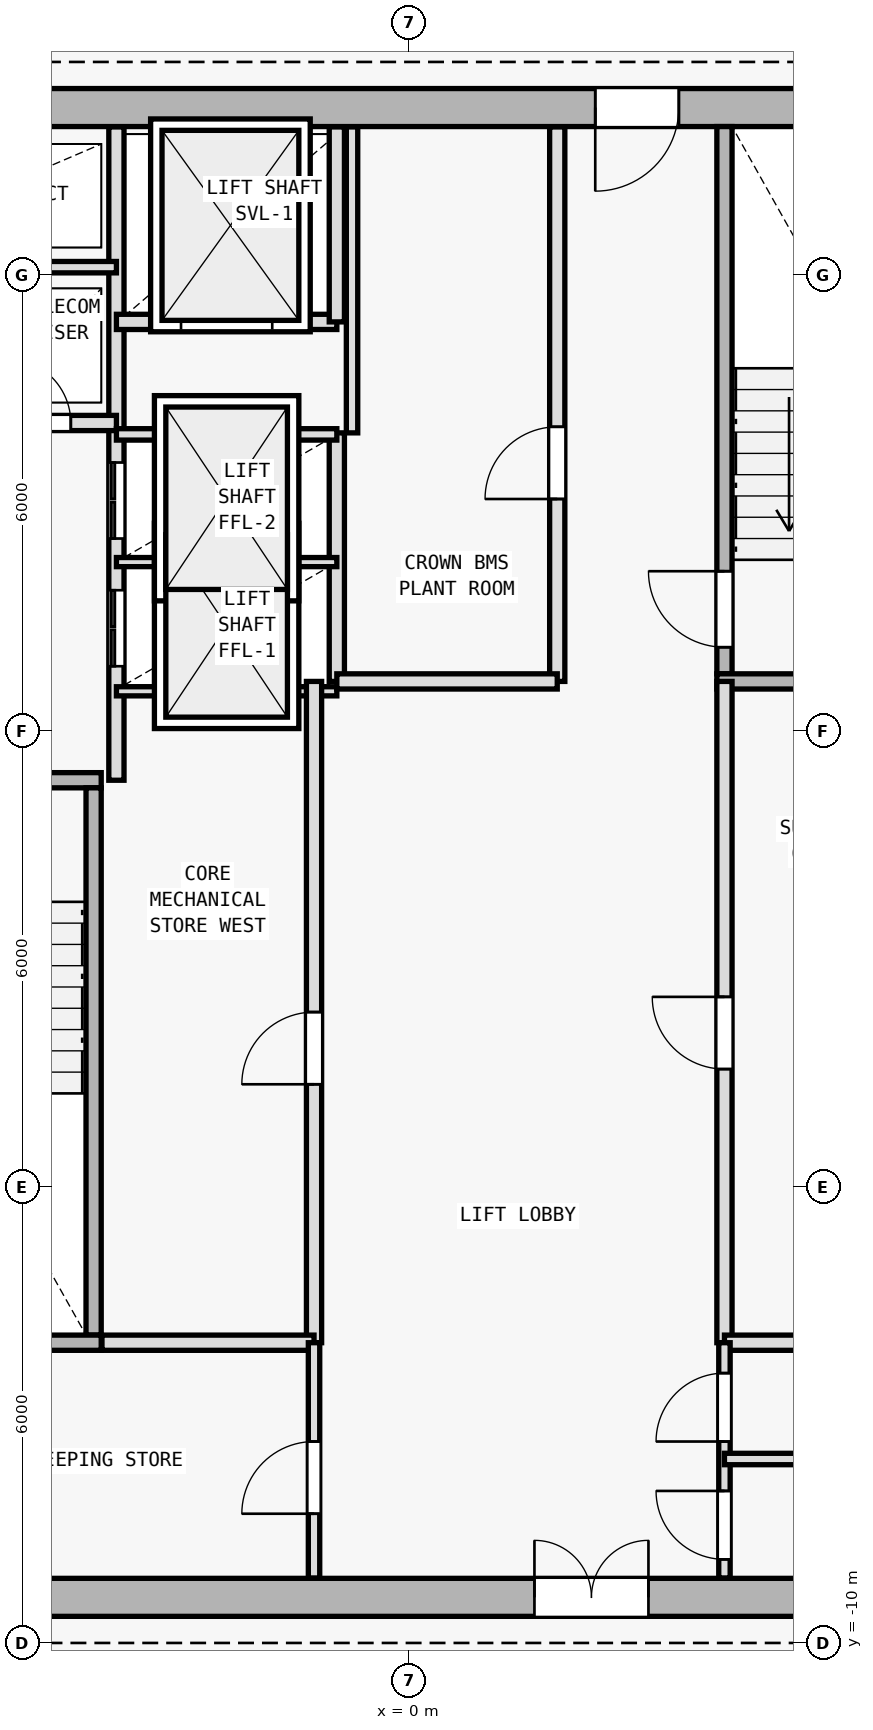
"""IFC4 building model, lengths in metres.
Left out: names, types, materials, properties, quantities, classifications, styles, units other than length and angle.
Written with IfcOpenShell. Run it as: python <this file> out.ifc"""

import sys

from ifc_helpers import new_model, si_unit, direction, frame, frame_2d, origin, origin_2d, place, context, subcontext, project, spatial, rectangle, i_section, extrude, element, fill, save


model = new_model("IFC4")
c1 = context("Model", 3, precision=1e-05, world=origin(), true_north=direction((0.0, 1.0)))
c2 = subcontext(c1, "Body", "Model", "MODEL_VIEW")
j1 = project(units=[si_unit("LENGTHUNIT", "METRE"), si_unit("PLANEANGLEUNIT", "RADIAN")], contexts=[c1])
p1 = place(None, origin())
s1 = spatial("IfcSite", under=j1, at=p1, CompositionType="ELEMENT")
p2 = place(p1, origin())
s2 = spatial("IfcBuilding", under=s1, at=p2, CompositionType="ELEMENT")
p3 = place(p2, frame((0.0, 0.0, 312.0)))
s3 = spatial("IfcBuildingStorey", under=s2, at=p3, CompositionType="ELEMENT", Elevation=312.0)
p4 = place(p3, frame((0.0, -9.4, 0.0), z_axis=(0.0, 0.0, 1.0), x_axis=(1.0, 0.0, 0.0)))
e1 = element("IfcColumn", 1, at=p4, inside=s3, PredefinedType="COLUMN", context=c2, shape_type="SweptSolid", body=[
    extrude(i_section(OverallWidth=0.374, OverallDepth=0.372, WebThickness=0.012, FlangeThickness=0.02, FilletRadius=0.015, at=origin_2d()), origin(), (0.0, 0.0, 1.0), 3.6),
])
p5 = place(p3, frame((-7.95, -9.4, 0.0), z_axis=(0.0, 0.0, 1.0), x_axis=(1.0, 0.0, 0.0)))
e2 = element("IfcWall", 2, at=p5, inside=s3, PredefinedType="SHEAR", context=c2, shape_type="SweptSolid", body=[
    extrude(rectangle(XDim=15.9, YDim=0.5, at=frame_2d((7.95, 0.0))), origin(), (0.0, 0.0, 1.0), 3.34),
])
p6 = place(p5, frame((9.6, 0.0, 0.0)))
e3 = element("IfcOpeningElement", 3, at=p6, cuts=e2, PredefinedType="OPENING", context=c2, shape_type="SweptSolid", body=[
    extrude(rectangle(XDim=1.5, YDim=2.2, at=frame_2d((0.75, 1.1))), frame((0.0, 0.26, 0.0), z_axis=(0.0, -1.0, 0.0), x_axis=(1.0, 0.0, 0.0)), (0.0, 0.0, 1.0), 0.52),
])
p7 = place(p3, frame((7.95, 10.2, 0.0), z_axis=(0.0, 0.0, 1.0), x_axis=(-1.0, 0.0, 0.0)))
e4 = element("IfcWall", 4, at=p7, inside=s3, PredefinedType="SHEAR", context=c2, shape_type="SweptSolid", body=[
    extrude(rectangle(XDim=15.9, YDim=0.5, at=frame_2d((7.95, 0.0))), origin(), (0.0, 0.0, 1.0), 3.34),
])
p8 = place(p7, frame((4.4, 0.0, 0.0)))
e5 = element("IfcOpeningElement", 5, at=p8, cuts=e4, PredefinedType="OPENING", context=c2, shape_type="SweptSolid", body=[
    extrude(rectangle(XDim=1.1, YDim=2.15, at=frame_2d((0.55, 1.075))), frame((0.0, 0.26, 0.0), z_axis=(0.0, -1.0, 0.0), x_axis=(1.0, 0.0, 0.0)), (0.0, 0.0, 1.0), 0.52),
])
p9 = place(p3, frame((-7.45, 1.35, 0.0), z_axis=(0.0, 0.0, 1.0), x_axis=(1.0, 0.0, 0.0)))
e6 = element("IfcWall", 6, at=p9, inside=s3, PredefinedType="SOLIDWALL", context=c2, shape_type="SweptSolid", body=[
    extrude(rectangle(XDim=3.4, YDim=0.2, at=frame_2d((1.7, 0.0))), origin(), (0.0, 0.0, 1.0), 3.34),
])
p10 = place(p9, frame((0.65, 0.0, 0.0)))
e7 = element("IfcOpeningElement", 7, at=p10, cuts=e6, PredefinedType="OPENING", context=c2, shape_type="SweptSolid", body=[
    extrude(rectangle(XDim=1.0, YDim=2.15, at=frame_2d((0.5, 1.075))), frame((0.0, 0.11, 0.0), z_axis=(0.0, -1.0, 0.0), x_axis=(1.0, 0.0, 0.0)), (0.0, 0.0, 1.0), 0.22),
])
p11 = place(p3, frame((-4.15, -5.95, 0.0), z_axis=(0.0, 0.0, 1.0), x_axis=(0.0, 1.0, 0.0)))
e8 = element("IfcWall", 8, at=p11, inside=s3, PredefinedType="SOLIDWALL", context=c2, shape_type="SweptSolid", body=[
    extrude(rectangle(XDim=7.2, YDim=0.2, at=frame_2d((3.6, 0.0))), origin(), (0.0, 0.0, 1.0), 3.34),
])
p12 = place(p3, frame((-3.85, 1.35, 0.0), z_axis=(0.0, 0.0, 1.0), x_axis=(0.0, 1.0, 0.0)))
e9 = element("IfcWall", 9, at=p12, inside=s3, PredefinedType="SOLIDWALL", context=c2, shape_type="SweptSolid", body=[
    extrude(rectangle(XDim=8.595, YDim=0.2, at=frame_2d((4.297, 0.0))), origin(), (0.0, 0.0, 1.0), 3.34),
])
p13 = place(p12, frame((1.5, 0.0, 0.0)))
e10 = element("IfcOpeningElement", 10, at=p13, cuts=e9, PredefinedType="OPENING", context=c2, shape_type="SweptSolid", body=[
    extrude(rectangle(XDim=1.0, YDim=2.15, at=frame_2d((0.5, 1.075))), frame((0.0, 0.11, 0.0), z_axis=(0.0, -1.0, 0.0), x_axis=(1.0, 0.0, 0.0)), (0.0, 0.0, 1.0), 0.22),
])
p14 = place(p12, frame((3.18, 0.0, 0.0)))
e11 = element("IfcOpeningElement", 11, at=p14, cuts=e9, PredefinedType="OPENING", context=c2, shape_type="SweptSolid", body=[
    extrude(rectangle(XDim=1.0, YDim=2.15, at=frame_2d((0.5, 1.075))), frame((0.0, 0.11, 0.0), z_axis=(0.0, -1.0, 0.0), x_axis=(1.0, 0.0, 0.0)), (0.0, 0.0, 1.0), 0.22),
])
p15 = place(p3, frame((-7.445, 6.05, 0.0), z_axis=(0.0, 0.0, 1.0), x_axis=(1.0, 0.0, 0.0)))
e12 = element("IfcWall", 12, at=p15, inside=s3, PredefinedType="SOLIDWALL", context=c2, shape_type="SweptSolid", body=[
    extrude(rectangle(XDim=3.595, YDim=0.2, at=frame_2d((1.797, 0.0))), origin(), (0.0, 0.0, 1.0), 3.34),
])
p16 = place(p15, frame((0.345, 0.0, 0.0)))
e13 = element("IfcOpeningElement", 13, at=p16, cuts=e12, PredefinedType="OPENING", context=c2, shape_type="SweptSolid", body=[
    extrude(rectangle(XDim=0.85, YDim=2.1, at=frame_2d((0.425, 1.05))), frame((0.0, 0.11, 0.0), z_axis=(0.0, -1.0, 0.0), x_axis=(1.0, 0.0, 0.0)), (0.0, 0.0, 1.0), 0.22),
])
p17 = place(p15, frame((2.145, 0.0, 0.0)))
e14 = element("IfcOpeningElement", 14, at=p17, cuts=e12, PredefinedType="OPENING", context=c2, shape_type="SweptSolid", body=[
    extrude(rectangle(XDim=0.85, YDim=2.1, at=frame_2d((0.425, 1.05))), frame((0.0, 0.11, 0.0), z_axis=(0.0, -1.0, 0.0), x_axis=(1.0, 0.0, 0.0)), (0.0, 0.0, 1.0), 0.22),
])
p18 = place(p3, frame((-7.445, 8.1, 0.0), z_axis=(0.0, 0.0, 1.0), x_axis=(1.0, 0.0, 0.0)))
e15 = element("IfcWall", 15, at=p18, inside=s3, PredefinedType="PARTITIONING", context=c2, shape_type="SweptSolid", body=[
    extrude(rectangle(XDim=3.595, YDim=0.15, at=frame_2d((1.797, 0.0))), origin(), (0.0, 0.0, 1.0), 3.34),
])
p19 = place(p3, frame((4.15, 2.75, 0.0), z_axis=(0.0, 0.0, 1.0), x_axis=(0.0, 1.0, 0.0)))
e16 = element("IfcWall", 16, at=p19, inside=s3, PredefinedType="SOLIDWALL", context=c2, shape_type="SweptSolid", body=[
    extrude(rectangle(XDim=7.2, YDim=0.2, at=frame_2d((3.6, 0.0))), origin(), (0.0, 0.0, 1.0), 3.34),
])
p20 = place(p19, frame((0.35, 0.0, 0.0)))
e17 = element("IfcOpeningElement", 17, at=p20, cuts=e16, PredefinedType="OPENING", context=c2, shape_type="SweptSolid", body=[
    extrude(rectangle(XDim=1.0, YDim=2.15, at=frame_2d((0.5, 1.075))), frame((0.0, 0.11, 0.0), z_axis=(0.0, -1.0, 0.0), x_axis=(1.0, 0.0, 0.0)), (0.0, 0.0, 1.0), 0.22),
])
p21 = place(p3, frame((4.05, 2.65, 0.0), z_axis=(0.0, 0.0, 1.0), x_axis=(1.0, 0.0, 0.0)))
e18 = element("IfcWall", 18, at=p21, inside=s3, PredefinedType="SOLIDWALL", context=c2, shape_type="SweptSolid", body=[
    extrude(rectangle(XDim=3.4, YDim=0.2, at=frame_2d((1.7, 0.0))), origin(), (0.0, 0.0, 1.0), 3.34),
])
p22 = place(p3, frame((-0.95, 2.65, 0.0), z_axis=(0.0, 0.0, 1.0), x_axis=(0.0, 1.0, 0.0)))
e19 = element("IfcWall", 19, at=p22, inside=s3, PredefinedType="SOLIDWALL", context=c2, shape_type="SweptSolid", body=[
    extrude(rectangle(XDim=3.27, YDim=0.2, at=frame_2d((1.635, 0.0))), origin(), (0.0, 0.0, 1.0), 3.34),
])
for number, where, z_axis, x_axis in (
    (20, (-3.85, 2.52, 0.0), (0.0, 0.0, 1.0), (1.0, 0.0, 0.0)),
    (21, (-3.85, 4.22, 0.0), (0.0, 0.0, 1.0), (1.0, 0.0, 0.0)),
):
    element("IfcWall", number, at=place(p3, frame(where, z_axis=z_axis, x_axis=x_axis)), inside=s3, PredefinedType="PARTITIONING", context=c2, shape_type="SweptSolid", body=[
        extrude(rectangle(XDim=2.9, YDim=0.12, at=frame_2d((1.45, 0.0))), origin(), (0.0, 0.0, 1.0), 3.34),
    ])
p23 = place(p3, frame((-3.85, 5.9, 0.0), z_axis=(0.0, 0.0, 1.0), x_axis=(1.0, 0.0, 0.0)))
e22 = element("IfcWall", 22, at=p23, inside=s3, PredefinedType="PARTITIONING", context=c2, shape_type="SweptSolid", body=[
    extrude(rectangle(XDim=2.9, YDim=0.15, at=frame_2d((1.45, 0.0))), origin(), (0.0, 0.0, 1.0), 3.34),
])
p24 = place(p3, frame((-3.85, 7.38, 0.0), z_axis=(0.0, 0.0, 1.0), x_axis=(1.0, 0.0, 0.0)))
e23 = element("IfcWall", 23, at=p24, inside=s3, PredefinedType="SOLIDWALL", context=c2, shape_type="SweptSolid", body=[
    extrude(rectangle(XDim=2.9, YDim=0.2, at=frame_2d((1.45, 0.0))), origin(), (0.0, 0.0, 1.0), 3.34),
])
p25 = place(p24, frame((0.85, 0.0, 0.0)))
e24 = element("IfcOpeningElement", 24, at=p25, cuts=e23, PredefinedType="OPENING", context=c2, shape_type="SweptSolid", body=[
    extrude(rectangle(XDim=1.2, YDim=2.2, at=frame_2d((0.6, 1.1))), frame((0.0, 0.11, 0.0), z_axis=(0.0, -1.0, 0.0), x_axis=(1.0, 0.0, 0.0)), (0.0, 0.0, 1.0), 0.22),
])
p26 = place(p3, frame((-0.95, 7.38, 0.0), z_axis=(0.0, 0.0, 1.0), x_axis=(0.0, 1.0, 0.0)))
e25 = element("IfcWall", 25, at=p26, inside=s3, PredefinedType="SOLIDWALL", context=c2, shape_type="SweptSolid", body=[
    extrude(rectangle(XDim=2.565, YDim=0.2, at=frame_2d((1.283, 0.0))), origin(), (0.0, 0.0, 1.0), 3.34),
])
p27 = place(p3, frame((4.15, -6.05, 0.0), z_axis=(0.0, 0.0, 1.0), x_axis=(0.0, 1.0, 0.0)))
e26 = element("IfcWall", 26, at=p27, inside=s3, PredefinedType="SOLIDWALL", context=c2, shape_type="SweptSolid", body=[
    extrude(rectangle(XDim=8.7, YDim=0.2, at=frame_2d((4.35, 0.0))), origin(), (0.0, 0.0, 1.0), 3.34),
])
p28 = place(p27, frame((3.6, 0.0, 0.0)))
e27 = element("IfcOpeningElement", 27, at=p28, cuts=e26, PredefinedType="OPENING", context=c2, shape_type="SweptSolid", body=[
    extrude(rectangle(XDim=0.95, YDim=2.1, at=frame_2d((0.475, 1.05))), frame((0.0, 0.11, 0.0), z_axis=(0.0, -1.0, 0.0), x_axis=(1.0, 0.0, 0.0)), (0.0, 0.0, 1.0), 0.22),
])
p29 = place(p3, frame((-1.25, -6.05, 0.0), z_axis=(0.0, 0.0, 1.0), x_axis=(0.0, 1.0, 0.0)))
e28 = element("IfcWall", 28, at=p29, inside=s3, PredefinedType="SOLIDWALL", context=c2, shape_type="SweptSolid", body=[
    extrude(rectangle(XDim=8.7, YDim=0.2, at=frame_2d((4.35, 0.0))), origin(), (0.0, 0.0, 1.0), 3.34),
])
p30 = place(p29, frame((3.4, 0.0, 0.0)))
e29 = element("IfcOpeningElement", 29, at=p30, cuts=e28, PredefinedType="OPENING", context=c2, shape_type="SweptSolid", body=[
    extrude(rectangle(XDim=0.95, YDim=2.1, at=frame_2d((0.475, 1.05))), frame((0.0, 0.11, 0.0), z_axis=(0.0, -1.0, 0.0), x_axis=(1.0, 0.0, 0.0)), (0.0, 0.0, 1.0), 0.22),
])
p31 = place(p3, frame((1.95, 2.65, 0.0), z_axis=(0.0, 0.0, 1.0), x_axis=(0.0, 1.0, 0.0)))
e30 = element("IfcWall", 30, at=p31, inside=s3, PredefinedType="SOLIDWALL", context=c2, shape_type="SweptSolid", body=[
    extrude(rectangle(XDim=7.295, YDim=0.2, at=frame_2d((3.647, 0.0))), origin(), (0.0, 0.0, 1.0), 3.34),
])
p32 = place(p31, frame((2.4, 0.0, 0.0)))
e31 = element("IfcOpeningElement", 31, at=p32, cuts=e30, PredefinedType="OPENING", context=c2, shape_type="SweptSolid", body=[
    extrude(rectangle(XDim=0.95, YDim=2.1, at=frame_2d((0.475, 1.05))), frame((0.0, 0.11, 0.0), z_axis=(0.0, -1.0, 0.0), x_axis=(1.0, 0.0, 0.0)), (0.0, 0.0, 1.0), 0.22),
])
p33 = place(p3, frame((-0.95, 2.65, 0.0), z_axis=(0.0, 0.0, 1.0), x_axis=(1.0, 0.0, 0.0)))
e32 = element("IfcWall", 32, at=p33, inside=s3, PredefinedType="SOLIDWALL", context=c2, shape_type="SweptSolid", body=[
    extrude(rectangle(XDim=2.9, YDim=0.2, at=frame_2d((1.45, 0.0))), origin(), (0.0, 0.0, 1.0), 3.34),
])
p34 = place(p3, frame((-0.75, 5.92, 0.0), z_axis=(0.0, 0.0, 1.0), x_axis=(0.0, 1.0, 0.0)))
e33 = element("IfcWall", 33, at=p34, inside=s3, PredefinedType="PARTITIONING", context=c2, shape_type="SweptSolid", body=[
    extrude(rectangle(XDim=4.025, YDim=0.15, at=frame_2d((2.013, 0.0))), origin(), (0.0, 0.0, 1.0), 3.34),
])
p35 = place(p3, frame((-7.45, -6.05, 0.0), z_axis=(0.0, 0.0, 1.0), x_axis=(1.0, 0.0, 0.0)))
e34 = element("IfcWall", 34, at=p35, inside=s3, PredefinedType="SOLIDWALL", context=c2, shape_type="SweptSolid", body=[
    extrude(rectangle(XDim=3.4, YDim=0.2, at=frame_2d((1.7, 0.0))), origin(), (0.0, 0.0, 1.0), 3.34),
])
p36 = place(p3, frame((-4.04, -6.05, 0.0), z_axis=(0.0, 0.0, 1.0), x_axis=(1.0, 0.0, 0.0)))
e35 = element("IfcWall", 35, at=p36, inside=s3, PredefinedType="SOLIDWALL", context=c2, shape_type="SweptSolid", body=[
    extrude(rectangle(XDim=2.79, YDim=0.2, at=frame_2d((1.395, 0.0))), origin(), (0.0, 0.0, 1.0), 3.34),
])
p37 = place(p3, frame((4.15, -6.05, 0.0), z_axis=(0.0, 0.0, 1.0), x_axis=(1.0, 0.0, 0.0)))
e36 = element("IfcWall", 36, at=p37, inside=s3, PredefinedType="SOLIDWALL", context=c2, shape_type="SweptSolid", body=[
    extrude(rectangle(XDim=3.295, YDim=0.2, at=frame_2d((1.647, 0.0))), origin(), (0.0, 0.0, 1.0), 3.34),
])
p38 = place(p3, frame((-1.25, -9.145, 0.0), z_axis=(0.0, 0.0, 1.0), x_axis=(0.0, 1.0, 0.0)))
e37 = element("IfcWall", 37, at=p38, inside=s3, PredefinedType="PARTITIONING", context=c2, shape_type="SweptSolid", body=[
    extrude(rectangle(XDim=3.095, YDim=0.15, at=frame_2d((1.547, 0.0))), origin(), (0.0, 0.0, 1.0), 3.34),
])
p39 = place(p38, frame((0.845, 0.0, 0.0)))
e38 = element("IfcOpeningElement", 38, at=p39, cuts=e37, PredefinedType="OPENING", context=c2, shape_type="SweptSolid", body=[
    extrude(rectangle(XDim=0.95, YDim=2.1, at=frame_2d((0.475, 1.05))), frame((0.0, 0.085, 0.0), z_axis=(0.0, -1.0, 0.0), x_axis=(1.0, 0.0, 0.0)), (0.0, 0.0, 1.0), 0.17),
])
p40 = place(p3, frame((4.15, -9.145, 0.0), z_axis=(0.0, 0.0, 1.0), x_axis=(0.0, 1.0, 0.0)))
e39 = element("IfcWall", 39, at=p40, inside=s3, PredefinedType="PARTITIONING", context=c2, shape_type="SweptSolid", body=[
    extrude(rectangle(XDim=3.095, YDim=0.15, at=frame_2d((1.547, 0.0))), origin(), (0.0, 0.0, 1.0), 3.34),
])
p41 = place(p40, frame((0.245, 0.0, 0.0)))
e40 = element("IfcOpeningElement", 40, at=p41, cuts=e39, PredefinedType="OPENING", context=c2, shape_type="SweptSolid", body=[
    extrude(rectangle(XDim=0.9, YDim=2.1, at=frame_2d((0.45, 1.05))), frame((0.0, 0.085, 0.0), z_axis=(0.0, -1.0, 0.0), x_axis=(1.0, 0.0, 0.0)), (0.0, 0.0, 1.0), 0.17),
])
p42 = place(p40, frame((1.795, 0.0, 0.0)))
e41 = element("IfcOpeningElement", 41, at=p42, cuts=e39, PredefinedType="OPENING", context=c2, shape_type="SweptSolid", body=[
    extrude(rectangle(XDim=0.9, YDim=2.1, at=frame_2d((0.45, 1.05))), frame((0.0, 0.085, 0.0), z_axis=(0.0, -1.0, 0.0), x_axis=(1.0, 0.0, 0.0)), (0.0, 0.0, 1.0), 0.17),
])
p43 = place(p3, frame((4.15, -7.58, 0.0), z_axis=(0.0, 0.0, 1.0), x_axis=(1.0, 0.0, 0.0)))
e42 = element("IfcWall", 42, at=p43, inside=s3, PredefinedType="PARTITIONING", context=c2, shape_type="SweptSolid", body=[
    extrude(rectangle(XDim=3.295, YDim=0.15, at=frame_2d((1.647, 0.0))), origin(), (0.0, 0.0, 1.0), 3.34),
])
p44 = place(p6, origin())
e43 = element("IfcDoor", 43, at=p44, inside=s3, OperationType="DOUBLE_DOOR_SINGLE_SWING", PredefinedType="DOOR", context=c2, shape_type="SweptSolid", body=[
    extrude(rectangle(XDim=1.5, YDim=2.2, at=frame_2d((0.75, 1.1))), frame((0.0, 0.025, 0.0), z_axis=(0.0, -1.0, 0.0), x_axis=(1.0, 0.0, 0.0)), (0.0, 0.0, 1.0), 0.05),
])
fill(e3, e43)
p45 = place(p8, origin())
e44 = element("IfcDoor", 44, at=p45, inside=s3, OperationType="SINGLE_SWING_RIGHT", PredefinedType="DOOR", context=c2, shape_type="SweptSolid", body=[
    extrude(rectangle(XDim=1.1, YDim=2.15, at=frame_2d((0.55, 1.075))), frame((0.0, 0.025, 0.0), z_axis=(0.0, -1.0, 0.0), x_axis=(1.0, 0.0, 0.0)), (0.0, 0.0, 1.0), 0.05),
])
fill(e5, e44)
p46 = place(p17, origin())
e45 = element("IfcDoor", 45, at=p46, inside=s3, OperationType="SINGLE_SWING_LEFT", PredefinedType="DOOR", context=c2, shape_type="SweptSolid", body=[
    extrude(rectangle(XDim=0.85, YDim=2.1, at=frame_2d((0.425, 1.05))), frame((0.0, 0.025, 0.0), z_axis=(0.0, -1.0, 0.0), x_axis=(1.0, 0.0, 0.0)), (0.0, 0.0, 1.0), 0.05),
])
fill(e14, e45)
p47 = place(p20, origin())
e46 = element("IfcDoor", 46, at=p47, inside=s3, OperationType="SINGLE_SWING_RIGHT", PredefinedType="DOOR", context=c2, shape_type="SweptSolid", body=[
    extrude(rectangle(XDim=1.0, YDim=2.15, at=frame_2d((0.5, 1.075))), frame((0.0, 0.025, 0.0), z_axis=(0.0, -1.0, 0.0), x_axis=(1.0, 0.0, 0.0)), (0.0, 0.0, 1.0), 0.05),
])
fill(e17, e46)
p48 = place(p25, origin())
e47 = element("IfcDoor", 47, at=p48, inside=s3, OperationType="DOUBLE_DOOR_SLIDING", PredefinedType="DOOR", context=c2, shape_type="SweptSolid", body=[
    extrude(rectangle(XDim=1.2, YDim=2.2, at=frame_2d((0.6, 1.1))), frame((0.0, 0.025, 0.0), z_axis=(0.0, -1.0, 0.0), x_axis=(1.0, 0.0, 0.0)), (0.0, 0.0, 1.0), 0.05),
])
fill(e24, e47)
p49 = place(p28, origin())
e48 = element("IfcDoor", 48, at=p49, inside=s3, OperationType="SINGLE_SWING_RIGHT", PredefinedType="DOOR", context=c2, shape_type="SweptSolid", body=[
    extrude(rectangle(XDim=0.95, YDim=2.1, at=frame_2d((0.475, 1.05))), frame((0.0, 0.025, 0.0), z_axis=(0.0, -1.0, 0.0), x_axis=(1.0, 0.0, 0.0)), (0.0, 0.0, 1.0), 0.05),
])
fill(e27, e48)
p50 = place(p30, origin())
e49 = element("IfcDoor", 49, at=p50, inside=s3, OperationType="SINGLE_SWING_LEFT", PredefinedType="DOOR", context=c2, shape_type="SweptSolid", body=[
    extrude(rectangle(XDim=0.95, YDim=2.1, at=frame_2d((0.475, 1.05))), frame((0.0, 0.025, 0.0), z_axis=(0.0, -1.0, 0.0), x_axis=(1.0, 0.0, 0.0)), (0.0, 0.0, 1.0), 0.05),
])
fill(e29, e49)
p51 = place(p32, origin())
e50 = element("IfcDoor", 50, at=p51, inside=s3, OperationType="SINGLE_SWING_LEFT", PredefinedType="DOOR", context=c2, shape_type="SweptSolid", body=[
    extrude(rectangle(XDim=0.95, YDim=2.1, at=frame_2d((0.475, 1.05))), frame((0.0, 0.025, 0.0), z_axis=(0.0, -1.0, 0.0), x_axis=(1.0, 0.0, 0.0)), (0.0, 0.0, 1.0), 0.05),
])
fill(e31, e50)
p52 = place(p13, origin())
e51 = element("IfcDoor", 51, at=p52, inside=s3, OperationType="DOUBLE_DOOR_SLIDING", PredefinedType="DOOR", context=c2, shape_type="SweptSolid", body=[
    extrude(rectangle(XDim=1.0, YDim=2.15, at=frame_2d((0.5, 1.075))), frame((0.0, 0.025, 0.0), z_axis=(0.0, -1.0, 0.0), x_axis=(1.0, 0.0, 0.0)), (0.0, 0.0, 1.0), 0.05),
])
fill(e10, e51)
p53 = place(p14, origin())
e52 = element("IfcDoor", 52, at=p53, inside=s3, OperationType="DOUBLE_DOOR_SLIDING", PredefinedType="DOOR", context=c2, shape_type="SweptSolid", body=[
    extrude(rectangle(XDim=1.0, YDim=2.15, at=frame_2d((0.5, 1.075))), frame((0.0, 0.025, 0.0), z_axis=(0.0, -1.0, 0.0), x_axis=(1.0, 0.0, 0.0)), (0.0, 0.0, 1.0), 0.05),
])
fill(e11, e52)
p54 = place(p39, origin())
e53 = element("IfcDoor", 53, at=p54, inside=s3, OperationType="SINGLE_SWING_LEFT", PredefinedType="DOOR", context=c2, shape_type="SweptSolid", body=[
    extrude(rectangle(XDim=0.95, YDim=2.1, at=frame_2d((0.475, 1.05))), frame((0.0, 0.025, 0.0), z_axis=(0.0, -1.0, 0.0), x_axis=(1.0, 0.0, 0.0)), (0.0, 0.0, 1.0), 0.05),
])
fill(e38, e53)
p55 = place(p41, origin())
e54 = element("IfcDoor", 54, at=p55, inside=s3, OperationType="SINGLE_SWING_RIGHT", PredefinedType="DOOR", context=c2, shape_type="SweptSolid", body=[
    extrude(rectangle(XDim=0.9, YDim=2.1, at=frame_2d((0.45, 1.05))), frame((0.0, 0.025, 0.0), z_axis=(0.0, -1.0, 0.0), x_axis=(1.0, 0.0, 0.0)), (0.0, 0.0, 1.0), 0.05),
])
fill(e40, e54)
p56 = place(p42, origin())
e55 = element("IfcDoor", 55, at=p56, inside=s3, OperationType="SINGLE_SWING_LEFT", PredefinedType="DOOR", context=c2, shape_type="SweptSolid", body=[
    extrude(rectangle(XDim=0.9, YDim=2.1, at=frame_2d((0.45, 1.05))), frame((0.0, 0.025, 0.0), z_axis=(0.0, -1.0, 0.0), x_axis=(1.0, 0.0, 0.0)), (0.0, 0.0, 1.0), 0.05),
])
fill(e41, e55)
save(model, sys.argv[1])
